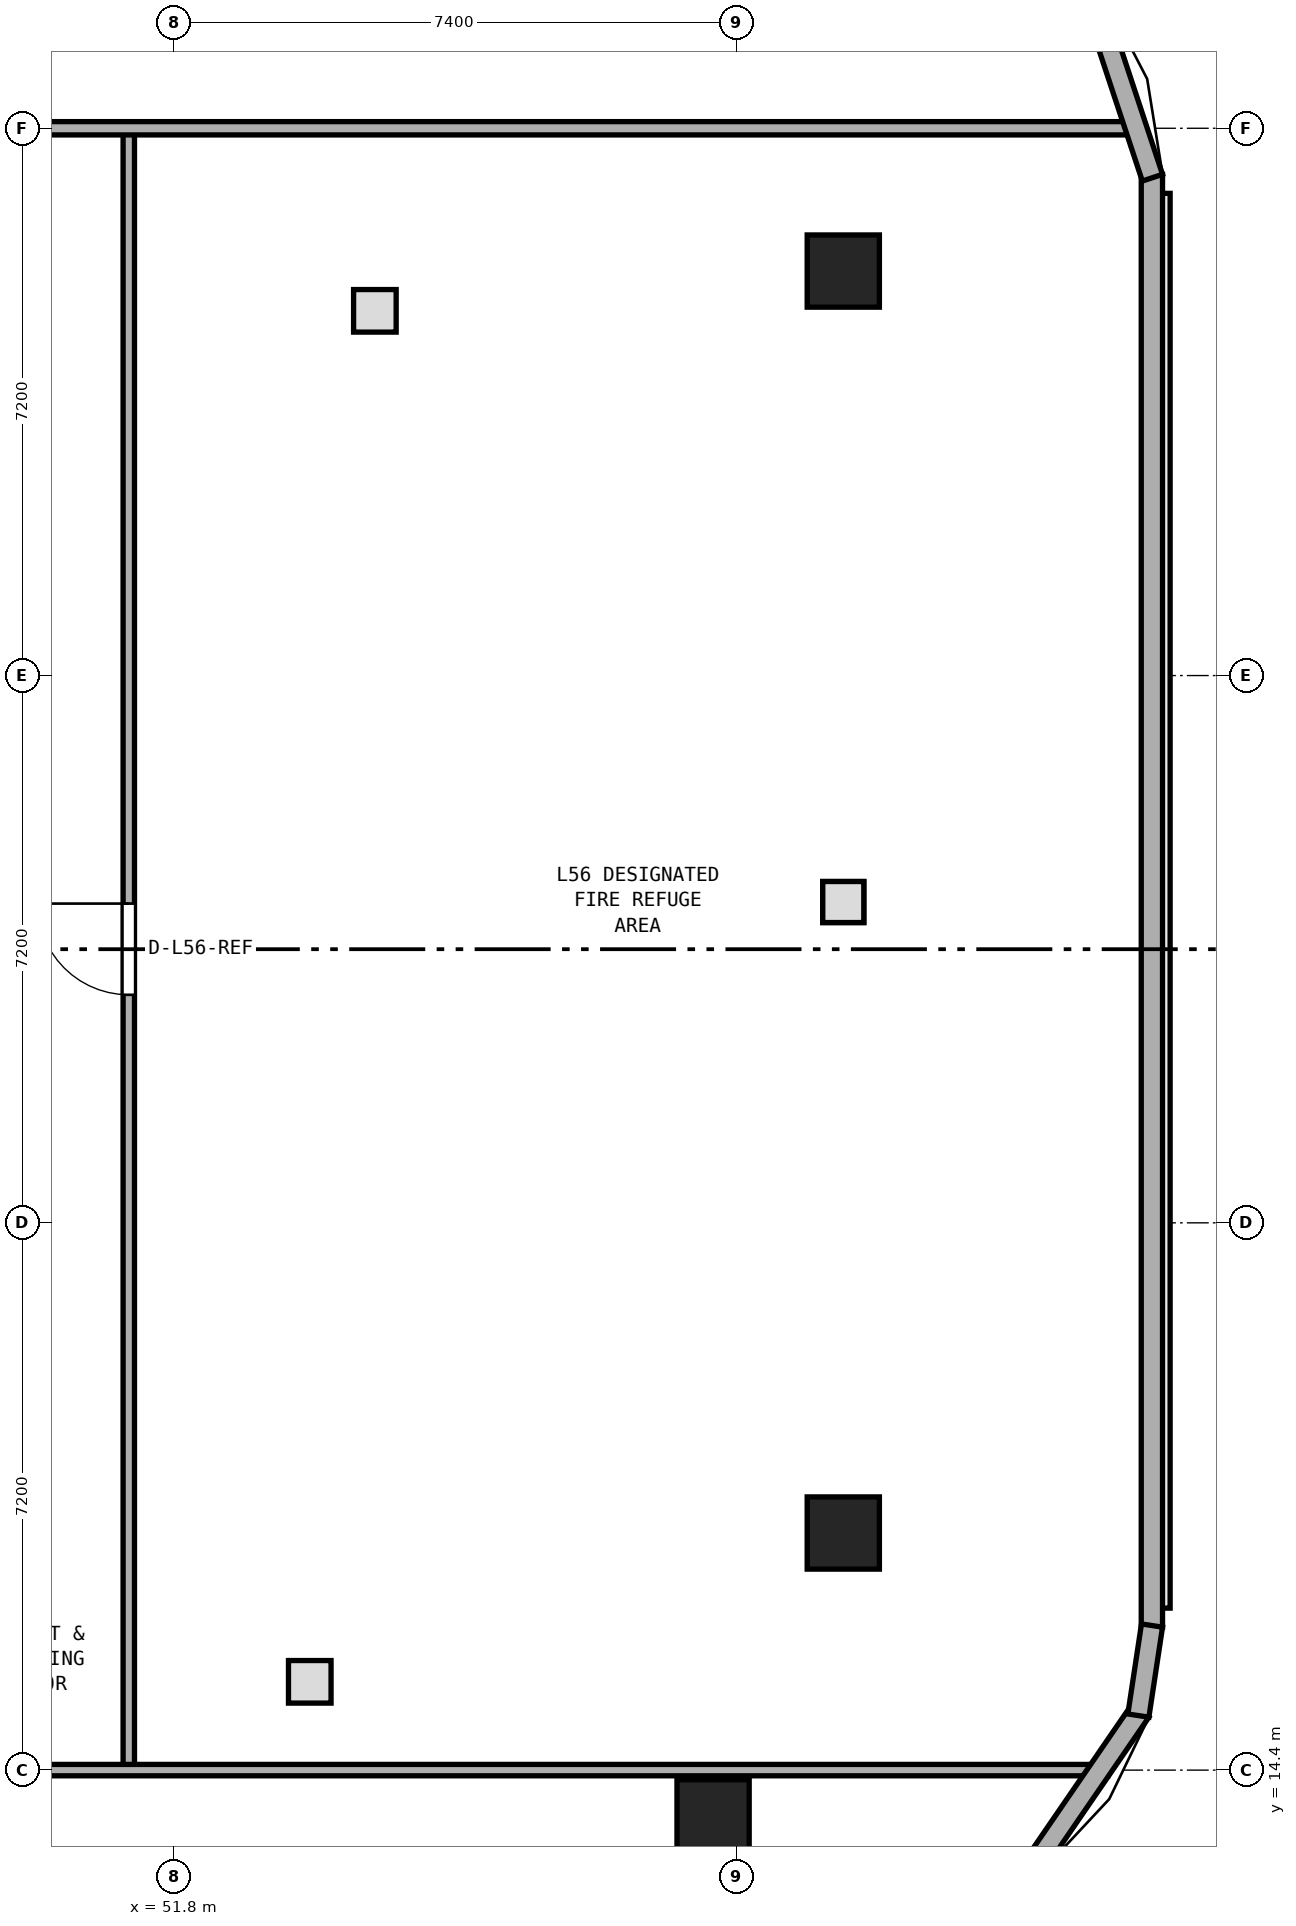
"""IFC4 building model, lengths in metres.
Left out: names, types, materials, properties, quantities, classifications, styles, units other than length and angle.
Written with IfcOpenShell. Run it as: python <this file> out.ifc"""

import sys

from ifc_helpers import new_model, si_unit, direction, frame, frame_2d, origin, origin_2d, place, context, subcontext, project, spatial, rectangle, extrude, element, fill, save


model = new_model("IFC4")
c1 = context("Model", 3, precision=1e-05, world=origin(), true_north=direction((0.0, 1.0)))
c2 = subcontext(c1, "Body", "Model", "MODEL_VIEW")
j1 = project(units=[si_unit("LENGTHUNIT", "METRE"), si_unit("PLANEANGLEUNIT", "RADIAN")], contexts=[c1])
p1 = place(None, origin())
s1 = spatial("IfcSite", under=j1, at=p1, CompositionType="ELEMENT")
p2 = place(p1, origin())
s2 = spatial("IfcBuilding", under=s1, at=p2, CompositionType="ELEMENT")
p3 = place(p2, frame((0.0, 0.0, 220.0)))
s3 = spatial("IfcBuildingStorey", under=s2, at=p3, CompositionType="ELEMENT", Elevation=220.0)
for number, where, z_axis, x_axis in (
    (1, (58.887, 13.798, 0.0), (0.0, 0.0, 1.0), (1.0, 0.0, 0.0)),
    (2, (60.6, 17.519, 0.0), (0.0, 0.0, 1.0), (1.0, 0.0, 0.0)),
    (3, (60.6, 34.122, 0.0), (0.0, 0.0, 1.0), (1.0, 0.0, 0.0)),
):
    element("IfcColumn", number, at=place(p3, frame(where, z_axis=z_axis, x_axis=x_axis)), inside=s3, PredefinedType="COLUMN", context=c2, shape_type="SweptSolid", body=[
        extrude(rectangle(XDim=0.95, YDim=0.95, at=origin_2d()), origin(), (0.0, 0.0, 1.0), 5.0),
    ])
p4 = place(p3, frame((51.2, 14.4, 0.0), z_axis=(0.0, 0.0, 1.0), x_axis=(0.0, 1.0, 0.0)))
e4 = element("IfcWall", 4, at=p4, inside=s3, PredefinedType="PARTITIONING", context=c2, shape_type="SweptSolid", body=[
    extrude(rectangle(XDim=21.6, YDim=0.15, at=frame_2d((10.8, 0.0))), origin(), (0.0, 0.0, 1.0), 4.71),
])
p5 = place(p4, frame((10.2, 0.0, 0.0)))
e5 = element("IfcOpeningElement", 5, at=p5, cuts=e4, PredefinedType="OPENING", context=c2, shape_type="SweptSolid", body=[
    extrude(rectangle(XDim=1.2, YDim=2.15, at=frame_2d((0.6, 1.075))), frame((0.0, 0.085, 0.0), z_axis=(0.0, -1.0, 0.0), x_axis=(1.0, 0.0, 0.0)), (0.0, 0.0, 1.0), 0.17),
])
p6 = place(p3, frame((11.459, 14.4, 0.0), z_axis=(0.0, 0.0, 1.0), x_axis=(1.0, 0.0, 0.0)))
e6 = element("IfcWall", 6, at=p6, inside=s3, PredefinedType="PARTITIONING", context=c2, shape_type="SweptSolid", body=[
    extrude(rectangle(XDim=52.619, YDim=0.15, at=frame_2d((26.31, 0.0))), origin(), (0.0, 0.0, 1.0), 2.31),
])
p7 = place(p6, frame((25.041, 0.0, 0.0)))
e7 = element("IfcOpeningElement", 7, at=p7, cuts=e6, PredefinedType="OPENING", context=c2, shape_type="SweptSolid", body=[
    extrude(rectangle(XDim=1.0, YDim=2.04, at=frame_2d((0.5, 1.02))), frame((0.0, 0.085, 0.0), z_axis=(0.0, -1.0, 0.0), x_axis=(1.0, 0.0, 0.0)), (0.0, 0.0, 1.0), 0.17),
])
p8 = place(p3, frame((11.895, 36.0, 0.0), z_axis=(0.0, 0.0, 1.0), x_axis=(1.0, 0.0, 0.0)))
e8 = element("IfcWall", 8, at=p8, inside=s3, PredefinedType="PARTITIONING", context=c2, shape_type="SweptSolid", body=[
    extrude(rectangle(XDim=52.603, YDim=0.175, at=frame_2d((26.301, 0.0))), origin(), (0.0, 0.0, 1.0), 2.31),
])
p9 = place(p8, frame((24.605, 0.0, 0.0)))
e9 = element("IfcOpeningElement", 9, at=p9, cuts=e8, PredefinedType="OPENING", context=c2, shape_type="SweptSolid", body=[
    extrude(rectangle(XDim=1.0, YDim=2.04, at=frame_2d((0.5, 1.02))), frame((0.0, 0.097, 0.0), z_axis=(0.0, -1.0, 0.0), x_axis=(1.0, 0.0, 0.0)), (0.0, 0.0, 1.0), 0.195),
])
p10 = place(p3, frame((64.66, 16.281, 0.0), z_axis=(0.0, 0.0, 1.0), x_axis=(0.0, 1.0, 0.0)))
e10 = element("IfcWall", 10, at=p10, inside=s3, PredefinedType="STANDARD", context=c2, shape_type="SweptSolid", body=[
    extrude(rectangle(XDim=19.113, YDim=0.28, at=frame_2d((9.556, 0.0))), origin(), (0.0, 0.0, 1.0), 2.31),
])
p11 = place(p3, frame((63.165, 13.222, 0.0), z_axis=(0.0, 0.0, 1.0), x_axis=(0.565732602928, 0.824588759313, 0.0)))
e11 = element("IfcWall", 11, at=p11, inside=s3, PredefinedType="STANDARD", context=c2, shape_type="SweptSolid", body=[
    extrude(rectangle(XDim=2.369, YDim=0.28, at=frame_2d((1.185, 0.0))), origin(), (0.0, 0.0, 1.0), 2.31),
])
p12 = place(p3, frame((64.482, 15.117, 0.0), z_axis=(0.0, 0.0, 1.0), x_axis=(0.149775197129, 0.988720076829, 0.0)))
e12 = element("IfcWall", 12, at=p12, inside=s3, PredefinedType="STANDARD", context=c2, shape_type="SweptSolid", body=[
    extrude(rectangle(XDim=1.198, YDim=0.28, at=frame_2d((0.599, 0.0))), origin(), (0.0, 0.0, 1.0), 2.31),
])
p13 = place(p3, frame((64.667, 35.35, 0.0), z_axis=(0.0, 0.0, 1.0), x_axis=(-0.313953102685, 0.949438491591, 0.0)))
e13 = element("IfcWall", 13, at=p13, inside=s3, PredefinedType="STANDARD", context=c2, shape_type="SweptSolid", body=[
    extrude(rectangle(XDim=2.512, YDim=0.28, at=frame_2d((1.256, 0.0))), origin(), (0.0, 0.0, 1.0), 4.71),
])
p14 = place(p5, origin())
e14 = element("IfcDoor", 14, at=p14, inside=s3, OperationType="SINGLE_SWING_RIGHT", PredefinedType="DOOR", context=c2, shape_type="SweptSolid", body=[
    extrude(rectangle(XDim=1.2, YDim=2.15, at=frame_2d((0.6, 1.075))), frame((0.0, 0.025, 0.0), z_axis=(0.0, -1.0, 0.0), x_axis=(1.0, 0.0, 0.0)), (0.0, 0.0, 1.0), 0.05),
])
fill(e5, e14)
save(model, sys.argv[1])
